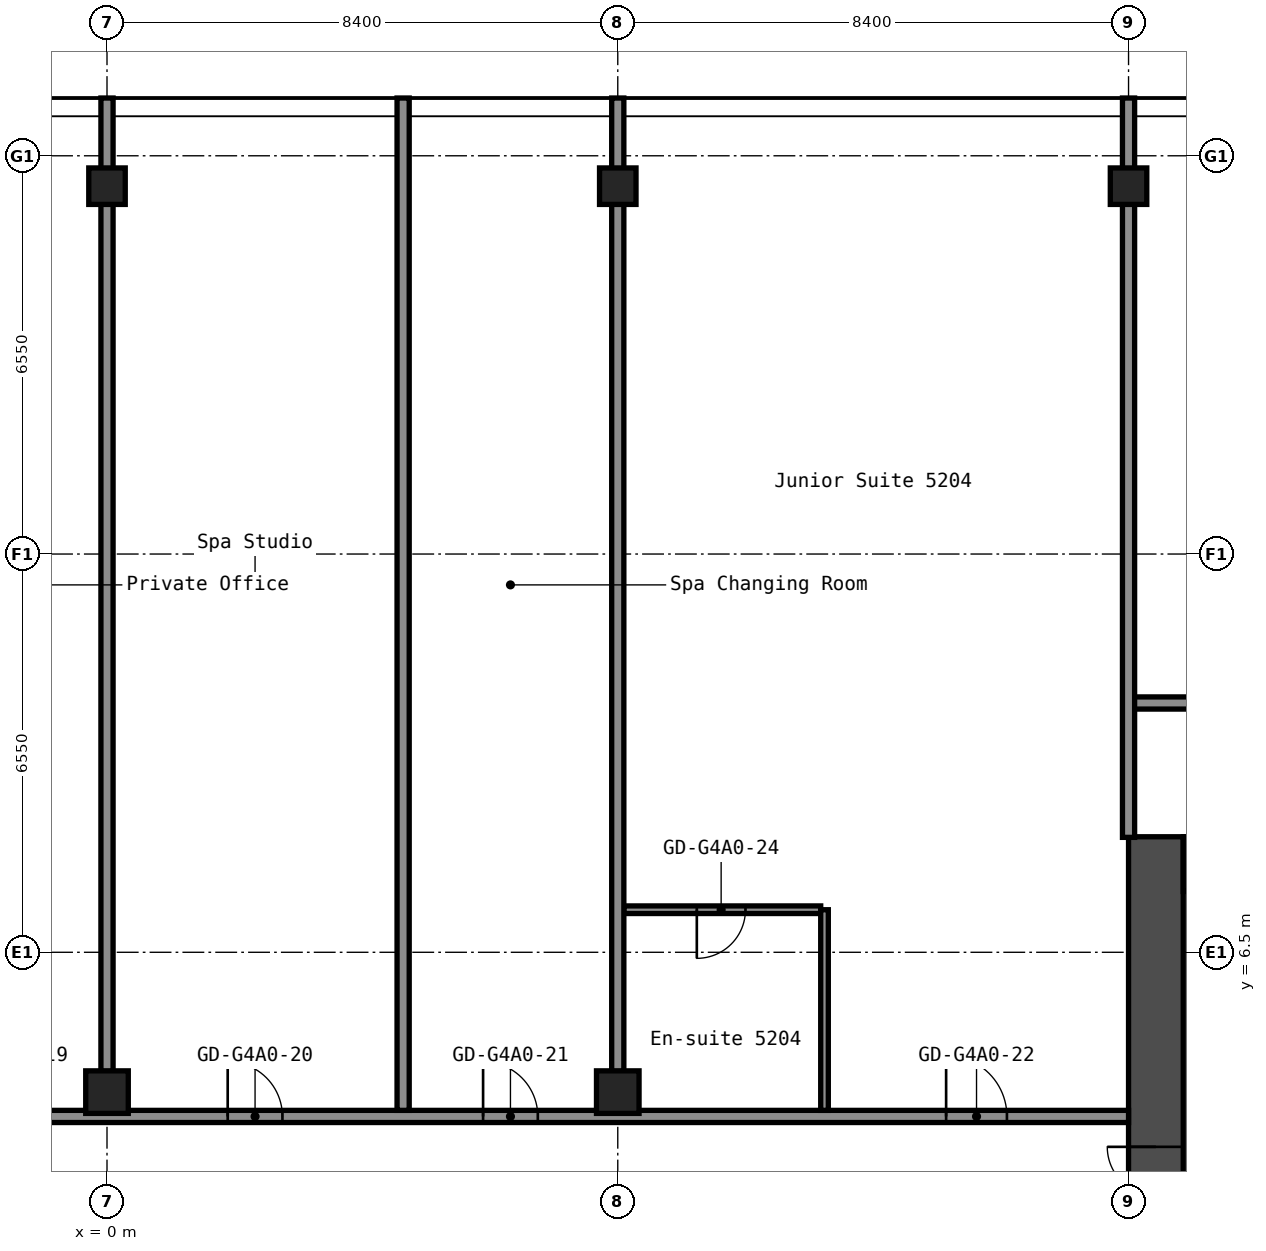
"""IFC4 building model, lengths in metres.
Left out: names, types, materials, properties, quantities, classifications, styles, units other than length and angle.
Written with IfcOpenShell. Run it as: python <this file> out.ifc"""

import sys

from ifc_helpers import new_model, si_unit, direction, frame, frame_2d, origin, origin_2d, place, context, subcontext, project, spatial, rectangle, hollow_rectangle, extrude, element, fill, save


model = new_model("IFC4")
c1 = context("Model", 3, precision=1e-05, world=origin(), true_north=direction((0.0, 1.0)))
c2 = subcontext(c1, "Body", "Model", "MODEL_VIEW")
j1 = project(units=[si_unit("LENGTHUNIT", "METRE"), si_unit("PLANEANGLEUNIT", "RADIAN")], contexts=[c1])
p1 = place(None, origin())
s1 = spatial("IfcSite", under=j1, at=p1, CompositionType="ELEMENT")
p2 = place(p1, origin())
s2 = spatial("IfcBuilding", under=s1, at=p2, CompositionType="ELEMENT")
p3 = place(p2, frame((0.0, 0.0, 186.6)))
s3 = spatial("IfcBuildingStorey", under=s2, at=p3, CompositionType="ELEMENT", Elevation=186.6)
p4 = place(p3, frame((0.0, 4.2, 0.0), z_axis=(0.0, 0.0, 1.0), x_axis=(1.0, 0.0, 0.0)))
e1 = element("IfcColumn", 1, at=p4, inside=s3, PredefinedType="COLUMN", context=c2, shape_type="SweptSolid", body=[
    extrude(hollow_rectangle(XDim=0.7, YDim=0.7, WallThickness=0.028, at=origin_2d()), origin(), (0.0, 0.0, 1.0), 2.75),
])
p5 = place(p3, frame((0.0, 19.1, 0.0), z_axis=(0.0, 0.0, 1.0), x_axis=(1.0, 0.0, 0.0)))
e2 = element("IfcColumn", 2, at=p5, inside=s3, PredefinedType="COLUMN", context=c2, shape_type="SweptSolid", body=[
    extrude(hollow_rectangle(XDim=0.6, YDim=0.6, WallThickness=0.025, InnerFilletRadius=0.038, OuterFilletRadius=0.062, at=origin_2d()), origin(), (0.0, 0.0, 1.0), 2.75),
])
p6 = place(p3, frame((8.4, 4.2, 0.0), z_axis=(0.0, 0.0, 1.0), x_axis=(1.0, 0.0, 0.0)))
e3 = element("IfcColumn", 3, at=p6, inside=s3, PredefinedType="COLUMN", context=c2, shape_type="SweptSolid", body=[
    extrude(hollow_rectangle(XDim=0.7, YDim=0.7, WallThickness=0.028, at=origin_2d()), origin(), (0.0, 0.0, 1.0), 2.75),
])
for number, where, z_axis, x_axis in (
    (4, (8.4, 19.1, 0.0), (0.0, 0.0, 1.0), (1.0, 0.0, 0.0)),
    (5, (16.8, 19.1, 0.0), (0.0, 0.0, 1.0), (1.0, 0.0, 0.0)),
):
    element("IfcColumn", number, at=place(p3, frame(where, z_axis=z_axis, x_axis=x_axis)), inside=s3, PredefinedType="COLUMN", context=c2, shape_type="SweptSolid", body=[
        extrude(hollow_rectangle(XDim=0.6, YDim=0.6, WallThickness=0.025, InnerFilletRadius=0.038, OuterFilletRadius=0.062, at=origin_2d()), origin(), (0.0, 0.0, 1.0), 2.75),
    ])
p7 = place(p3, frame((17.25, -8.4, 0.0), z_axis=(0.0, 0.0, 1.0), x_axis=(0.0, 1.0, 0.0)))
e6 = element("IfcWall", 6, at=p7, inside=s3, PredefinedType="SHEAR", context=c2, shape_type="SweptSolid", body=[
    extrude(rectangle(XDim=16.8, YDim=0.9, at=frame_2d((8.4, 0.0))), origin(), (0.0, 0.0, 1.0), 2.75),
])
p8 = place(p7, frame((10.1, 0.0, 0.0)))
e7 = element("IfcOpeningElement", 7, at=p8, cuts=e6, PredefinedType="OPENING", context=c2, shape_type="SweptSolid", body=[
    extrude(rectangle(XDim=1.6, YDim=2.1, at=frame_2d((0.8, 1.05))), frame((0.0, 0.46, 0.0), z_axis=(0.0, -1.0, 0.0), x_axis=(1.0, 0.0, 0.0)), (0.0, 0.0, 1.0), 0.92),
])
p9 = place(p3, frame((17.7, 7.95, 0.0), z_axis=(0.0, 0.0, 1.0), x_axis=(1.0, 0.0, 0.0)))
e8 = element("IfcWall", 8, at=p9, inside=s3, PredefinedType="SHEAR", context=c2, shape_type="SweptSolid", body=[
    extrude(rectangle(XDim=15.0, YDim=0.9, at=frame_2d((7.5, 0.0))), origin(), (0.0, 0.0, 1.0), 2.75),
])
p10 = place(p9, frame((10.4, 0.0, 0.0)))
e9 = element("IfcOpeningElement", 9, at=p10, cuts=e8, PredefinedType="OPENING", context=c2, shape_type="SweptSolid", body=[
    extrude(rectangle(XDim=1.2, YDim=2.1, at=frame_2d((0.6, 1.05))), frame((0.0, 0.46, 0.0), z_axis=(0.0, -1.0, 0.0), x_axis=(1.0, 0.0, 0.0)), (0.0, 0.0, 1.0), 0.92),
])
p11 = place(p9, frame((13.35, 0.0, 0.0)))
e10 = element("IfcOpeningElement", 10, at=p11, cuts=e8, PredefinedType="OPENING", context=c2, shape_type="SweptSolid", body=[
    extrude(rectangle(XDim=0.9, YDim=2.1, at=frame_2d((0.45, 1.05))), frame((0.0, 0.46, 0.0), z_axis=(0.0, -1.0, 0.0), x_axis=(1.0, 0.0, 0.0)), (0.0, 0.0, 1.0), 0.92),
])
p12 = place(p3, frame((-16.8, 3.8, 0.0), z_axis=(0.0, 0.0, 1.0), x_axis=(1.0, 0.0, 0.0)))
e11 = element("IfcWall", 11, at=p12, inside=s3, PredefinedType="PARTITIONING", context=c2, shape_type="SweptSolid", body=[
    extrude(rectangle(XDim=33.6, YDim=0.2, at=frame_2d((16.8, 0.0))), origin(), (0.0, 0.0, 1.0), 2.75),
])
p13 = place(p12, frame((2.0, 0.0, 0.0)))
e12 = element("IfcOpeningElement", 12, at=p13, cuts=e11, PredefinedType="OPENING", context=c2, shape_type="SweptSolid", body=[
    extrude(rectangle(XDim=1.0, YDim=2.1, at=frame_2d((0.5, 1.05))), frame((0.0, 0.11, 0.0), z_axis=(0.0, -1.0, 0.0), x_axis=(1.0, 0.0, 0.0)), (0.0, 0.0, 1.0), 0.22),
])
p14 = place(p12, frame((10.555, 0.0, 0.0)))
e13 = element("IfcOpeningElement", 13, at=p14, cuts=e11, PredefinedType="OPENING", context=c2, shape_type="SweptSolid", body=[
    extrude(rectangle(XDim=0.9, YDim=2.1, at=frame_2d((0.45, 1.05))), frame((0.0, 0.11, 0.0), z_axis=(0.0, -1.0, 0.0), x_axis=(1.0, 0.0, 0.0)), (0.0, 0.0, 1.0), 0.22),
])
p15 = place(p12, frame((14.755, 0.0, 0.0)))
e14 = element("IfcOpeningElement", 14, at=p15, cuts=e11, PredefinedType="OPENING", context=c2, shape_type="SweptSolid", body=[
    extrude(rectangle(XDim=0.9, YDim=2.1, at=frame_2d((0.45, 1.05))), frame((0.0, 0.11, 0.0), z_axis=(0.0, -1.0, 0.0), x_axis=(1.0, 0.0, 0.0)), (0.0, 0.0, 1.0), 0.22),
])
p16 = place(p12, frame((18.785, 0.0, 0.0)))
e15 = element("IfcOpeningElement", 15, at=p16, cuts=e11, PredefinedType="OPENING", context=c2, shape_type="SweptSolid", body=[
    extrude(rectangle(XDim=0.9, YDim=2.1, at=frame_2d((0.45, 1.05))), frame((0.0, 0.11, 0.0), z_axis=(0.0, -1.0, 0.0), x_axis=(1.0, 0.0, 0.0)), (0.0, 0.0, 1.0), 0.22),
])
p17 = place(p12, frame((22.985, 0.0, 0.0)))
e16 = element("IfcOpeningElement", 16, at=p17, cuts=e11, PredefinedType="OPENING", context=c2, shape_type="SweptSolid", body=[
    extrude(rectangle(XDim=0.9, YDim=2.1, at=frame_2d((0.45, 1.05))), frame((0.0, 0.11, 0.0), z_axis=(0.0, -1.0, 0.0), x_axis=(1.0, 0.0, 0.0)), (0.0, 0.0, 1.0), 0.22),
])
p18 = place(p12, frame((30.6, 0.0, 0.0)))
e17 = element("IfcOpeningElement", 17, at=p18, cuts=e11, PredefinedType="OPENING", context=c2, shape_type="SweptSolid", body=[
    extrude(rectangle(XDim=1.0, YDim=2.1, at=frame_2d((0.5, 1.05))), frame((0.0, 0.11, 0.0), z_axis=(0.0, -1.0, 0.0), x_axis=(1.0, 0.0, 0.0)), (0.0, 0.0, 1.0), 0.22),
])
p19 = place(p3, frame((8.5, 7.2, 0.0), z_axis=(0.0, 0.0, 1.0), x_axis=(1.0, 0.0, 0.0)))
e18 = element("IfcWall", 18, at=p19, inside=s3, PredefinedType="PARTITIONING", context=c2, shape_type="SweptSolid", body=[
    extrude(rectangle(XDim=3.238, YDim=0.125, at=frame_2d((1.619, 0.0))), origin(), (0.0, 0.0, 1.0), 2.75),
])
p20 = place(p19, frame((1.2, 0.0, 0.0)))
e19 = element("IfcOpeningElement", 19, at=p20, cuts=e18, PredefinedType="OPENING", context=c2, shape_type="SweptSolid", body=[
    extrude(rectangle(XDim=0.8, YDim=2.1, at=frame_2d((0.4, 1.05))), frame((0.0, 0.073, 0.0), z_axis=(0.0, -1.0, 0.0), x_axis=(1.0, 0.0, 0.0)), (0.0, 0.0, 1.0), 0.145),
])
p21 = place(p3, frame((16.8, 10.6, 0.0), z_axis=(0.0, 0.0, 1.0), x_axis=(1.0, 0.0, 0.0)))
e20 = element("IfcWall", 20, at=p21, inside=s3, PredefinedType="PARTITIONING", context=c2, shape_type="SweptSolid", body=[
    extrude(rectangle(XDim=21.3, YDim=0.2, at=frame_2d((10.65, 0.0))), origin(), (0.0, 0.0, 1.0), 2.75),
])
p22 = place(p21, frame((2.0, 0.0, 0.0)))
e21 = element("IfcOpeningElement", 21, at=p22, cuts=e20, PredefinedType="OPENING", context=c2, shape_type="SweptSolid", body=[
    extrude(rectangle(XDim=1.0, YDim=2.1, at=frame_2d((0.5, 1.05))), frame((0.0, 0.11, 0.0), z_axis=(0.0, -1.0, 0.0), x_axis=(1.0, 0.0, 0.0)), (0.0, 0.0, 1.0), 0.22),
])
p23 = place(p21, frame((10.4, 0.0, 0.0)))
e22 = element("IfcOpeningElement", 22, at=p23, cuts=e20, PredefinedType="OPENING", context=c2, shape_type="SweptSolid", body=[
    extrude(rectangle(XDim=1.0, YDim=2.1, at=frame_2d((0.5, 1.05))), frame((0.0, 0.11, 0.0), z_axis=(0.0, -1.0, 0.0), x_axis=(1.0, 0.0, 0.0)), (0.0, 0.0, 1.0), 0.22),
])
p24 = place(p21, frame((18.45, 0.0, 0.0)))
e23 = element("IfcOpeningElement", 23, at=p24, cuts=e20, PredefinedType="OPENING", context=c2, shape_type="SweptSolid", body=[
    extrude(rectangle(XDim=0.9, YDim=2.1, at=frame_2d((0.45, 1.05))), frame((0.0, 0.11, 0.0), z_axis=(0.0, -1.0, 0.0), x_axis=(1.0, 0.0, 0.0)), (0.0, 0.0, 1.0), 0.22),
])
p25 = place(p3, frame((0.0, 4.54, 0.0), z_axis=(0.0, 0.0, 1.0), x_axis=(0.0, 1.0, 0.0)))
e24 = element("IfcWall", 24, at=p25, inside=s3, PredefinedType="PARTITIONING", context=c2, shape_type="SweptSolid", body=[
    extrude(rectangle(XDim=16.01, YDim=0.2, at=frame_2d((8.005, 0.0))), origin(), (0.0, 0.0, 1.0), 2.75),
])
p26 = place(p3, frame((4.87, 3.9, 0.0), z_axis=(0.0, 0.0, 1.0), x_axis=(0.0, 1.0, 0.0)))
e25 = element("IfcWall", 25, at=p26, inside=s3, PredefinedType="PARTITIONING", context=c2, shape_type="SweptSolid", body=[
    extrude(rectangle(XDim=16.65, YDim=0.2, at=frame_2d((8.325, 0.0))), origin(), (0.0, 0.0, 1.0), 2.75),
])
p27 = place(p3, frame((8.4, 4.54, 0.0), z_axis=(0.0, 0.0, 1.0), x_axis=(0.0, 1.0, 0.0)))
e26 = element("IfcWall", 26, at=p27, inside=s3, PredefinedType="PARTITIONING", context=c2, shape_type="SweptSolid", body=[
    extrude(rectangle(XDim=16.01, YDim=0.2, at=frame_2d((8.005, 0.0))), origin(), (0.0, 0.0, 1.0), 2.75),
])
p28 = place(p3, frame((11.8, 3.9, 0.0), z_axis=(0.0, 0.0, 1.0), x_axis=(0.0, 1.0, 0.0)))
e27 = element("IfcWall", 27, at=p28, inside=s3, PredefinedType="PARTITIONING", context=c2, shape_type="SweptSolid", body=[
    extrude(rectangle(XDim=3.3, YDim=0.125, at=frame_2d((1.65, 0.0))), origin(), (0.0, 0.0, 1.0), 2.75),
])
p29 = place(p3, frame((16.8, 8.39, 0.0), z_axis=(0.0, 0.0, 1.0), x_axis=(0.0, 1.0, 0.0)))
e28 = element("IfcWall", 28, at=p29, inside=s3, PredefinedType="PARTITIONING", context=c2, shape_type="SweptSolid", body=[
    extrude(rectangle(XDim=12.16, YDim=0.2, at=frame_2d((6.08, 0.0))), origin(), (0.0, 0.0, 1.0), 2.75),
])
p30 = place(p8, origin())
e29 = element("IfcDoor", 29, at=p30, inside=s3, OperationType="DOUBLE_DOOR_SINGLE_SWING", PredefinedType="DOOR", context=c2, shape_type="SweptSolid", body=[
    extrude(rectangle(XDim=1.6, YDim=2.1, at=frame_2d((0.8, 1.05))), frame((0.0, 0.025, 0.0), z_axis=(0.0, -1.0, 0.0), x_axis=(1.0, 0.0, 0.0)), (0.0, 0.0, 1.0), 0.05),
])
fill(e7, e29)
p31 = place(p16, origin())
e30 = element("IfcDoor", 30, at=p31, inside=s3, OperationType="SINGLE_SWING_RIGHT", PredefinedType="DOOR", context=c2, shape_type="SweptSolid", body=[
    extrude(rectangle(XDim=0.9, YDim=2.1, at=frame_2d((0.45, 1.05))), frame((0.0, 0.025, 0.0), z_axis=(0.0, -1.0, 0.0), x_axis=(1.0, 0.0, 0.0)), (0.0, 0.0, 1.0), 0.05),
])
fill(e15, e30)
p32 = place(p17, origin())
e31 = element("IfcDoor", 31, at=p32, inside=s3, OperationType="SINGLE_SWING_RIGHT", PredefinedType="DOOR", context=c2, shape_type="SweptSolid", body=[
    extrude(rectangle(XDim=0.9, YDim=2.1, at=frame_2d((0.45, 1.05))), frame((0.0, 0.025, 0.0), z_axis=(0.0, -1.0, 0.0), x_axis=(1.0, 0.0, 0.0)), (0.0, 0.0, 1.0), 0.05),
])
fill(e16, e31)
p33 = place(p18, origin())
e32 = element("IfcDoor", 32, at=p33, inside=s3, OperationType="SINGLE_SWING_RIGHT", PredefinedType="DOOR", context=c2, shape_type="SweptSolid", body=[
    extrude(rectangle(XDim=1.0, YDim=2.1, at=frame_2d((0.5, 1.05))), frame((0.0, 0.025, 0.0), z_axis=(0.0, -1.0, 0.0), x_axis=(1.0, 0.0, 0.0)), (0.0, 0.0, 1.0), 0.05),
])
fill(e17, e32)
p34 = place(p20, origin())
e33 = element("IfcDoor", 33, at=p34, inside=s3, OperationType="SINGLE_SWING_LEFT", PredefinedType="DOOR", context=c2, shape_type="SweptSolid", body=[
    extrude(rectangle(XDim=0.8, YDim=2.1, at=frame_2d((0.4, 1.05))), frame((0.0, 0.025, 0.0), z_axis=(0.0, -1.0, 0.0), x_axis=(1.0, 0.0, 0.0)), (0.0, 0.0, 1.0), 0.05),
])
fill(e19, e33)
save(model, sys.argv[1])
